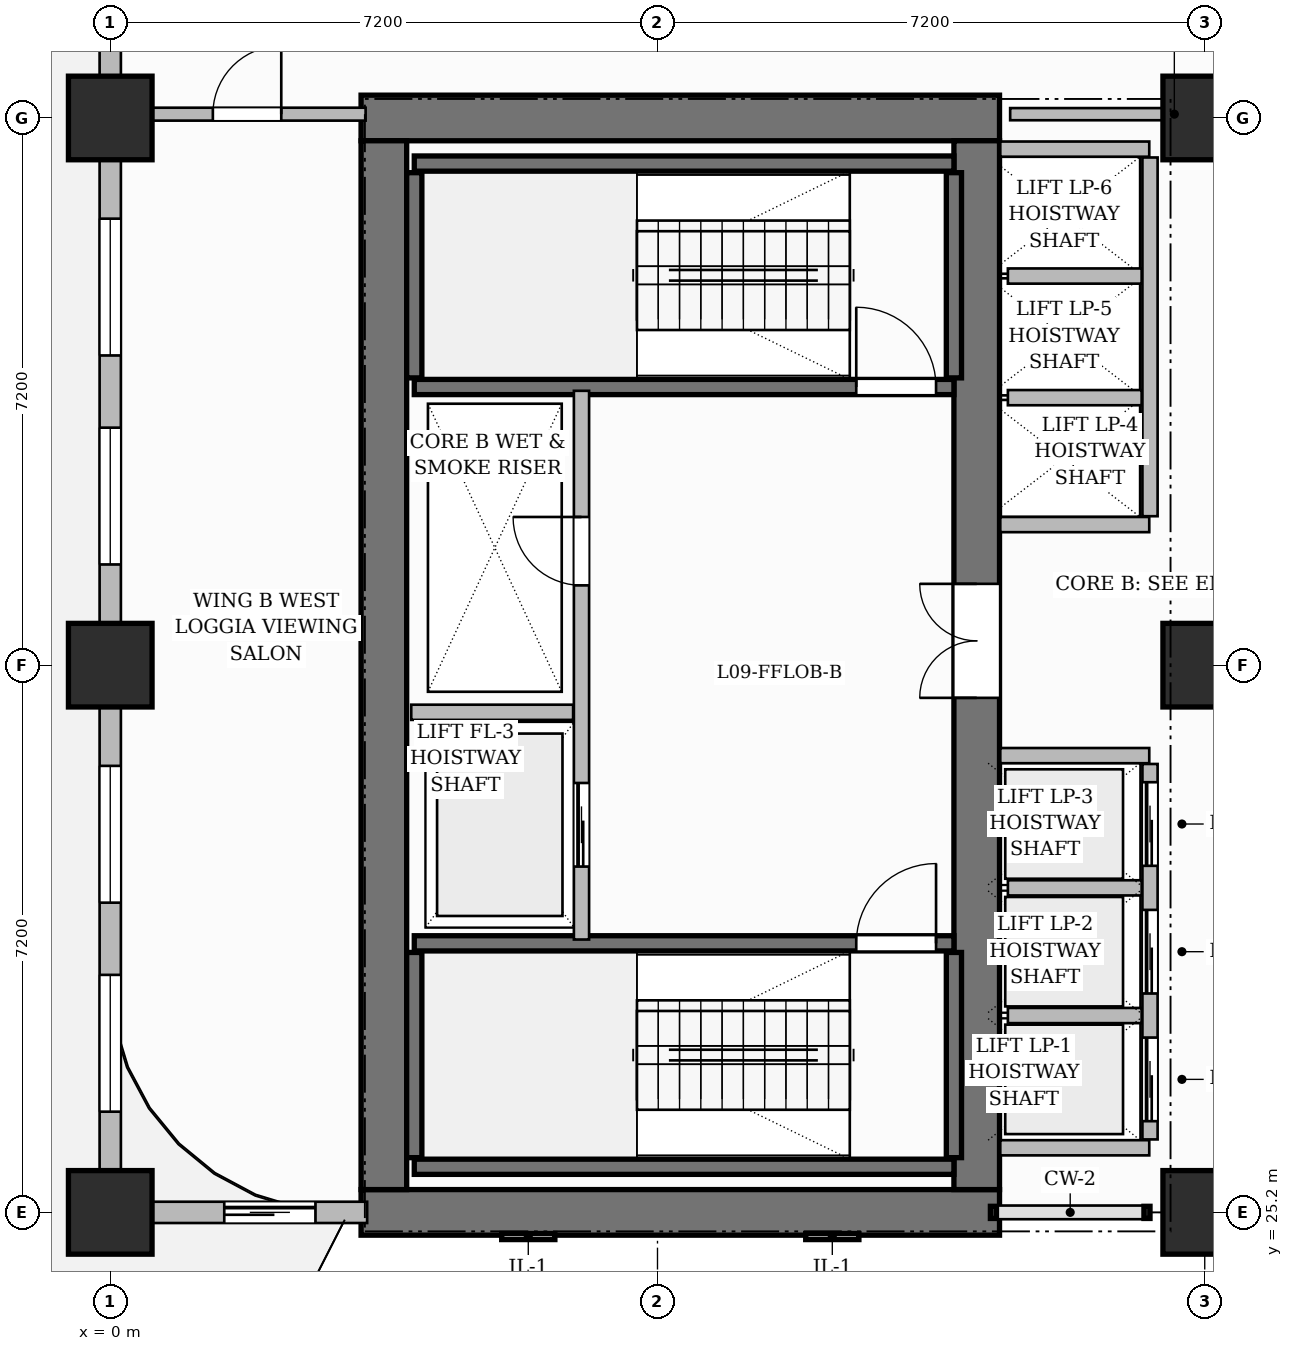
"""IFC4 building model, lengths in metres.
Left out: names, types, materials, properties, quantities, classifications, styles, units other than length and angle.
Written with IfcOpenShell. Run it as: python <this file> out.ifc"""

import sys

from ifc_helpers import new_model, si_unit, direction, frame, frame_2d, origin, origin_2d, place, context, subcontext, project, spatial, rectangle, extrude, source, transform, mapped, element, fill, save


model = new_model("IFC4")
c1 = context("Model", 3, precision=1e-05, world=origin(), true_north=direction((0.0, 1.0)))
c2 = subcontext(c1, "Body", "Model", "MODEL_VIEW")
j1 = project(units=[si_unit("LENGTHUNIT", "METRE"), si_unit("PLANEANGLEUNIT", "RADIAN")], contexts=[c1])
p1 = place(None, origin())
s1 = spatial("IfcSite", under=j1, at=p1, CompositionType="ELEMENT")
p2 = place(p1, origin())
s2 = spatial("IfcBuilding", under=s1, at=p2, CompositionType="ELEMENT")
p3 = place(p2, frame((0.0, 0.0, 43.5)))
s3 = spatial("IfcBuildingStorey", under=s2, at=p3, CompositionType="ELEMENT", Elevation=43.5)
for number, where, z_axis, x_axis in (
    (1, (3.3, 25.2, 0.0), (0.0, 0.0, 1.0), (1.0, 0.0, 0.0)),
    (2, (3.3, 39.6, 0.0), (0.0, 0.0, 1.0), (1.0, 0.0, 0.0)),
):
    element("IfcWall", number, at=place(p3, frame(where, z_axis=z_axis, x_axis=x_axis)), inside=s3, PredefinedType="SHEAR", context=c2, shape_type="SweptSolid", body=[
        extrude(rectangle(XDim=8.4, YDim=0.6, at=frame_2d((4.2, 0.0))), origin(), (0.0, 0.0, 1.0), 3.7),
    ])
p4 = place(p3, frame((3.6, 25.5, 0.0), z_axis=(0.0, 0.0, 1.0), x_axis=(0.0, 1.0, 0.0)))
e3 = element("IfcWall", 3, at=p4, inside=s3, PredefinedType="SHEAR", context=c2, shape_type="SweptSolid", body=[
    extrude(rectangle(XDim=13.8, YDim=0.6, at=frame_2d((6.9, 0.0))), origin(), (0.0, 0.0, 1.0), 3.7),
])
p5 = place(p3, frame((11.4, 25.5, 0.0), z_axis=(0.0, 0.0, 1.0), x_axis=(0.0, 1.0, 0.0)))
e4 = element("IfcWall", 4, at=p5, inside=s3, PredefinedType="SHEAR", context=c2, shape_type="SweptSolid", body=[
    extrude(rectangle(XDim=13.8, YDim=0.6, at=frame_2d((6.9, 0.0))), origin(), (0.0, 0.0, 1.0), 3.7),
])
p6 = place(p5, frame((6.47, 0.0, 0.0)))
e5 = element("IfcOpeningElement", 5, at=p6, cuts=e4, PredefinedType="OPENING", context=c2, shape_type="SweptSolid", body=[
    extrude(rectangle(XDim=1.5, YDim=2.2, at=frame_2d((0.75, 1.1))), frame((0.0, 0.31, 0.0), z_axis=(0.0, -1.0, 0.0), x_axis=(1.0, 0.0, 0.0)), (0.0, 0.0, 1.0), 0.62),
])
m1 = source(origin(), c2, "Body", "SweptSolid", [
    extrude(rectangle(XDim=1.1, YDim=1.1, at=origin_2d()), origin(), (0.0, 0.0, 1.0), 3.7),
])
for number, where, z_axis, x_axis in (
    (6, (0.0, 25.2, 0.0), (0.0, 0.0, 1.0), (1.0, 0.0, 0.0)),
    (7, (0.0, 32.4, 0.0), (0.0, 0.0, 1.0), (1.0, 0.0, 0.0)),
    (8, (0.0, 39.6, 0.0), (0.0, 0.0, 1.0), (1.0, 0.0, 0.0)),
    (9, (14.4, 25.2, 0.0), (0.0, 0.0, 1.0), (1.0, 0.0, 0.0)),
    (10, (14.4, 32.4, 0.0), (0.0, 0.0, 1.0), (1.0, 0.0, 0.0)),
    (11, (14.4, 39.6, 0.0), (0.0, 0.0, 1.0), (1.0, 0.0, 0.0)),
):
    element("IfcColumn", number, at=place(p3, frame(where, z_axis=z_axis, x_axis=x_axis)), inside=s3, PredefinedType="COLUMN", context=c2, shape_type="MappedRepresentation", body=[
        mapped(m1, transform((0.0, 0.0, 0.0), scale=1.0)),
    ])
p7 = place(p3, frame((4.0, 25.8, 0.0), z_axis=(0.0, 0.0, 1.0), x_axis=(1.0, 0.0, 0.0)))
e12 = element("IfcWall", 12, at=p7, inside=s3, PredefinedType="SHEAR", context=c2, shape_type="SweptSolid", body=[
    extrude(rectangle(XDim=7.1, YDim=0.2, at=frame_2d((3.55, 0.0))), origin(), (0.0, 0.0, 1.0), 3.7),
])
for number, where, z_axis, x_axis in (
    (13, (4.0, 25.92, 0.0), (0.0, 0.0, 1.0), (0.0, 1.0, 0.0)),
    (14, (11.1, 25.92, 0.0), (0.0, 0.0, 1.0), (0.0, 1.0, 0.0)),
):
    element("IfcWall", number, at=place(p3, frame(where, z_axis=z_axis, x_axis=x_axis)), inside=s3, PredefinedType="SHEAR", context=c2, shape_type="SweptSolid", body=[
        extrude(rectangle(XDim=2.7, YDim=0.2, at=frame_2d((1.35, 0.0))), origin(), (0.0, 0.0, 1.0), 3.7),
    ])
p8 = place(p3, frame((4.0, 28.74, 0.0), z_axis=(0.0, 0.0, 1.0), x_axis=(1.0, 0.0, 0.0)))
e15 = element("IfcWall", 15, at=p8, inside=s3, PredefinedType="SHEAR", context=c2, shape_type="SweptSolid", body=[
    extrude(rectangle(XDim=7.1, YDim=0.2, at=frame_2d((3.55, 0.0))), origin(), (0.0, 0.0, 1.0), 3.7),
])
p9 = place(p8, frame((5.815, 0.0, 0.0)))
e16 = element("IfcOpeningElement", 16, at=p9, cuts=e15, PredefinedType="OPENING", context=c2, shape_type="SweptSolid", body=[
    extrude(rectangle(XDim=1.05, YDim=2.2, at=frame_2d((0.525, 1.1))), frame((0.0, 0.11, 0.0), z_axis=(0.0, -1.0, 0.0), x_axis=(1.0, 0.0, 0.0)), (0.0, 0.0, 1.0), 0.22),
])
p10 = place(p3, frame((4.0, 39.0, 0.0), z_axis=(0.0, 0.0, 1.0), x_axis=(1.0, 0.0, 0.0)))
e17 = element("IfcWall", 17, at=p10, inside=s3, PredefinedType="SHEAR", context=c2, shape_type="SweptSolid", body=[
    extrude(rectangle(XDim=7.1, YDim=0.2, at=frame_2d((3.55, 0.0))), origin(), (0.0, 0.0, 1.0), 3.7),
])
for number, where, z_axis, x_axis in (
    (18, (4.0, 36.18, 0.0), (0.0, 0.0, 1.0), (0.0, 1.0, 0.0)),
    (19, (11.1, 36.18, 0.0), (0.0, 0.0, 1.0), (0.0, 1.0, 0.0)),
):
    element("IfcWall", number, at=place(p3, frame(where, z_axis=z_axis, x_axis=x_axis)), inside=s3, PredefinedType="SHEAR", context=c2, shape_type="SweptSolid", body=[
        extrude(rectangle(XDim=2.7, YDim=0.2, at=frame_2d((1.35, 0.0))), origin(), (0.0, 0.0, 1.0), 3.7),
    ])
p11 = place(p3, frame((4.0, 36.06, 0.0), z_axis=(0.0, 0.0, 1.0), x_axis=(1.0, 0.0, 0.0)))
e20 = element("IfcWall", 20, at=p11, inside=s3, PredefinedType="SHEAR", context=c2, shape_type="SweptSolid", body=[
    extrude(rectangle(XDim=7.1, YDim=0.2, at=frame_2d((3.55, 0.0))), origin(), (0.0, 0.0, 1.0), 3.7),
])
p12 = place(p11, frame((5.815, 0.0, 0.0)))
e21 = element("IfcOpeningElement", 21, at=p12, cuts=e20, PredefinedType="OPENING", context=c2, shape_type="SweptSolid", body=[
    extrude(rectangle(XDim=1.05, YDim=2.2, at=frame_2d((0.525, 1.1))), frame((0.0, 0.11, 0.0), z_axis=(0.0, -1.0, 0.0), x_axis=(1.0, 0.0, 0.0)), (0.0, 0.0, 1.0), 0.22),
])
p13 = place(p3, frame((6.2, 28.79, 0.0), z_axis=(0.0, 0.0, 1.0), x_axis=(0.0, 1.0, 0.0)))
e22 = element("IfcWall", 22, at=p13, inside=s3, PredefinedType="PARTITIONING", context=c2, shape_type="SweptSolid", body=[
    extrude(rectangle(XDim=7.22, YDim=0.2, at=frame_2d((3.61, 0.0))), origin(), (0.0, 0.0, 1.0), 3.45),
])
p14 = place(p13, frame((4.66, 0.0, 0.0)))
e23 = element("IfcOpeningElement", 23, at=p14, cuts=e22, PredefinedType="OPENING", context=c2, shape_type="SweptSolid", body=[
    extrude(rectangle(XDim=0.9, YDim=2.1, at=frame_2d((0.45, 1.05))), frame((0.0, 0.11, 0.0), z_axis=(0.0, -1.0, 0.0), x_axis=(1.0, 0.0, 0.0)), (0.0, 0.0, 1.0), 0.22),
])
p15 = place(p13, frame((0.96, 0.0, 0.0)))
e24 = element("IfcOpeningElement", 24, at=p15, cuts=e22, PredefinedType="OPENING", context=c2, shape_type="SweptSolid", body=[
    extrude(rectangle(XDim=1.1, YDim=2.2, at=frame_2d((0.55, 1.1))), frame((0.0, 0.11, 0.0), z_axis=(0.0, -1.0, 0.0), x_axis=(1.0, 0.0, 0.0)), (0.0, 0.0, 1.0), 0.22),
])
p16 = place(p3, frame((3.96, 31.78, 0.0), z_axis=(0.0, 0.0, 1.0), x_axis=(1.0, 0.0, 0.0)))
e25 = element("IfcWall", 25, at=p16, inside=s3, PredefinedType="PARTITIONING", context=c2, shape_type="SweptSolid", body=[
    extrude(rectangle(XDim=2.13, YDim=0.2, at=frame_2d((1.065, 0.0))), origin(), (0.0, 0.0, 1.0), 3.45),
])
for number, where, z_axis, x_axis in (
    (26, (11.71, 26.05, 0.0), (0.0, 0.0, 1.0), (1.0, 0.0, 0.0)),
    (27, (11.71, 31.21, 0.0), (0.0, 0.0, 1.0), (1.0, 0.0, 0.0)),
):
    element("IfcWall", number, at=place(p3, frame(where, z_axis=z_axis, x_axis=x_axis)), inside=s3, PredefinedType="PARTITIONING", context=c2, shape_type="SweptSolid", body=[
        extrude(rectangle(XDim=1.96, YDim=0.2, at=frame_2d((0.98, 0.0))), origin(), (0.0, 0.0, 1.0), 3.45),
    ])
p17 = place(p3, frame((13.68, 26.16, 0.0), z_axis=(0.0, 0.0, 1.0), x_axis=(0.0, 1.0, 0.0)))
e28 = element("IfcWall", 28, at=p17, inside=s3, PredefinedType="PARTITIONING", context=c2, shape_type="SweptSolid", body=[
    extrude(rectangle(XDim=4.94, YDim=0.2, at=frame_2d((2.47, 0.0))), origin(), (0.0, 0.0, 1.0), 3.45),
])
p18 = place(p17, frame((0.24, 0.0, 0.0)))
e29 = element("IfcOpeningElement", 29, at=p18, cuts=e28, PredefinedType="OPENING", context=c2, shape_type="SweptSolid", body=[
    extrude(rectangle(XDim=1.1, YDim=2.2, at=frame_2d((0.55, 1.1))), frame((0.0, 0.11, 0.0), z_axis=(0.0, -1.0, 0.0), x_axis=(1.0, 0.0, 0.0)), (0.0, 0.0, 1.0), 0.22),
])
p19 = place(p17, frame((1.92, 0.0, 0.0)))
e30 = element("IfcOpeningElement", 30, at=p19, cuts=e28, PredefinedType="OPENING", context=c2, shape_type="SweptSolid", body=[
    extrude(rectangle(XDim=1.1, YDim=2.2, at=frame_2d((0.55, 1.1))), frame((0.0, 0.11, 0.0), z_axis=(0.0, -1.0, 0.0), x_axis=(1.0, 0.0, 0.0)), (0.0, 0.0, 1.0), 0.22),
])
p20 = place(p17, frame((3.6, 0.0, 0.0)))
e31 = element("IfcOpeningElement", 31, at=p20, cuts=e28, PredefinedType="OPENING", context=c2, shape_type="SweptSolid", body=[
    extrude(rectangle(XDim=1.1, YDim=2.2, at=frame_2d((0.55, 1.1))), frame((0.0, 0.11, 0.0), z_axis=(0.0, -1.0, 0.0), x_axis=(1.0, 0.0, 0.0)), (0.0, 0.0, 1.0), 0.22),
])
for number, where, z_axis, x_axis in (
    (32, (11.81, 27.79, 0.0), (0.0, 0.0, 1.0), (1.0, 0.0, 0.0)),
    (33, (11.81, 29.47, 0.0), (0.0, 0.0, 1.0), (1.0, 0.0, 0.0)),
):
    element("IfcWall", number, at=place(p3, frame(where, z_axis=z_axis, x_axis=x_axis)), inside=s3, PredefinedType="PARTITIONING", context=c2, shape_type="SweptSolid", body=[
        extrude(rectangle(XDim=1.76, YDim=0.2, at=frame_2d((0.88, 0.0))), origin(), (0.0, 0.0, 1.0), 3.45),
    ])
for number, where, z_axis, x_axis in (
    (34, (11.71, 34.25, 0.0), (0.0, 0.0, 1.0), (1.0, 0.0, 0.0)),
    (35, (11.71, 39.19, 0.0), (0.0, 0.0, 1.0), (1.0, 0.0, 0.0)),
):
    element("IfcWall", number, at=place(p3, frame(where, z_axis=z_axis, x_axis=x_axis)), inside=s3, PredefinedType="PARTITIONING", context=c2, shape_type="SweptSolid", body=[
        extrude(rectangle(XDim=1.96, YDim=0.2, at=frame_2d((0.98, 0.0))), origin(), (0.0, 0.0, 1.0), 3.45),
    ])
p21 = place(p3, frame((13.68, 34.36, 0.0), z_axis=(0.0, 0.0, 1.0), x_axis=(0.0, 1.0, 0.0)))
e36 = element("IfcWall", 36, at=p21, inside=s3, PredefinedType="PARTITIONING", context=c2, shape_type="SweptSolid", body=[
    extrude(rectangle(XDim=4.72, YDim=0.2, at=frame_2d((2.36, 0.0))), origin(), (0.0, 0.0, 1.0), 3.45),
])
for number, where, z_axis, x_axis in (
    (37, (11.81, 35.92, 0.0), (0.0, 0.0, 1.0), (1.0, 0.0, 0.0)),
    (38, (11.81, 37.52, 0.0), (0.0, 0.0, 1.0), (1.0, 0.0, 0.0)),
):
    element("IfcWall", number, at=place(p3, frame(where, z_axis=z_axis, x_axis=x_axis)), inside=s3, PredefinedType="PARTITIONING", context=c2, shape_type="SweptSolid", body=[
        extrude(rectangle(XDim=1.76, YDim=0.2, at=frame_2d((0.88, 0.0))), origin(), (0.0, 0.0, 1.0), 3.45),
    ])
p22 = place(p3, frame((11.84, 39.65, 0.0), z_axis=(0.0, 0.0, 1.0), x_axis=(1.0, 0.0, 0.0)))
e39 = element("IfcWall", 39, at=p22, inside=s3, PredefinedType="PARTITIONING", context=c2, shape_type="SweptSolid", body=[
    extrude(rectangle(XDim=4.32, YDim=0.16, at=frame_2d((2.16, 0.0))), origin(), (0.0, 0.0, 1.0), 2.885),
])
p23 = place(p3, frame((0.24, 39.65, 0.0), z_axis=(0.0, 0.0, 1.0), x_axis=(1.0, 0.0, 0.0)))
e40 = element("IfcWall", 40, at=p23, inside=s3, PredefinedType="PARTITIONING", context=c2, shape_type="SweptSolid", body=[
    extrude(rectangle(XDim=3.12, YDim=0.17, at=frame_2d((1.56, 0.0))), origin(), (0.0, 0.0, 1.0), 3.45),
])
p24 = place(p23, frame((1.11, 0.0, 0.0)))
e41 = element("IfcOpeningElement", 41, at=p24, cuts=e40, PredefinedType="OPENING", context=c2, shape_type="SweptSolid", body=[
    extrude(rectangle(XDim=0.9, YDim=2.15, at=frame_2d((0.45, 1.075))), frame((0.0, 0.095, 0.0), z_axis=(0.0, -1.0, 0.0), x_axis=(1.0, 0.0, 0.0)), (0.0, 0.0, 1.0), 0.19),
])
p25 = place(p3, frame((0.0, 25.2, 0.0), z_axis=(0.0, 0.0, 1.0), x_axis=(1.0, 0.0, 0.0)))
e42 = element("IfcWall", 42, at=p25, inside=s3, PredefinedType="SOLIDWALL", context=c2, shape_type="SweptSolid", body=[
    extrude(rectangle(XDim=3.38, YDim=0.28, at=frame_2d((1.69, 0.0))), origin(), (0.0, 0.0, 1.0), 3.45),
])
p26 = place(p25, frame((1.5, 0.0, 0.0)))
e43 = element("IfcOpeningElement", 43, at=p26, cuts=e42, PredefinedType="OPENING", context=c2, shape_type="SweptSolid", body=[
    extrude(rectangle(XDim=1.2, YDim=2.2, at=frame_2d((0.6, 1.1))), frame((0.0, 0.15, 0.0), z_axis=(0.0, -1.0, 0.0), x_axis=(1.0, 0.0, 0.0)), (0.0, 0.0, 1.0), 0.3),
])
p27 = place(p3, frame((0.0, 25.25, 0.0), z_axis=(0.0, 0.0, 1.0), x_axis=(0.0, 1.0, 0.0)))
e44 = element("IfcWall", 44, at=p27, inside=s3, PredefinedType="SOLIDWALL", context=c2, shape_type="SweptSolid", body=[
    extrude(rectangle(XDim=21.5, YDim=0.28, at=frame_2d((10.75, 0.0))), origin(), (0.0, 0.0, 1.0), 2.885),
])
p28 = place(p27, frame((1.275, 0.0, 0.8)))
e45 = element("IfcOpeningElement", 45, at=p28, cuts=e44, PredefinedType="OPENING", context=c2, shape_type="SweptSolid", body=[
    extrude(rectangle(XDim=1.8, YDim=1.85, at=frame_2d((0.9, 0.925))), frame((0.0, 0.15, 0.0), z_axis=(0.0, -1.0, 0.0), x_axis=(1.0, 0.0, 0.0)), (0.0, 0.0, 1.0), 0.3),
])
p29 = place(p27, frame((4.025, 0.0, 0.8)))
e46 = element("IfcOpeningElement", 46, at=p29, cuts=e44, PredefinedType="OPENING", context=c2, shape_type="SweptSolid", body=[
    extrude(rectangle(XDim=1.8, YDim=1.85, at=frame_2d((0.9, 0.925))), frame((0.0, 0.15, 0.0), z_axis=(0.0, -1.0, 0.0), x_axis=(1.0, 0.0, 0.0)), (0.0, 0.0, 1.0), 0.3),
])
p30 = place(p27, frame((8.475, 0.0, 0.8)))
e47 = element("IfcOpeningElement", 47, at=p30, cuts=e44, PredefinedType="OPENING", context=c2, shape_type="SweptSolid", body=[
    extrude(rectangle(XDim=1.8, YDim=1.85, at=frame_2d((0.9, 0.925))), frame((0.0, 0.15, 0.0), z_axis=(0.0, -1.0, 0.0), x_axis=(1.0, 0.0, 0.0)), (0.0, 0.0, 1.0), 0.3),
])
p31 = place(p27, frame((11.225, 0.0, 0.8)))
e48 = element("IfcOpeningElement", 48, at=p31, cuts=e44, PredefinedType="OPENING", context=c2, shape_type="SweptSolid", body=[
    extrude(rectangle(XDim=1.8, YDim=1.85, at=frame_2d((0.9, 0.925))), frame((0.0, 0.15, 0.0), z_axis=(0.0, -1.0, 0.0), x_axis=(1.0, 0.0, 0.0)), (0.0, 0.0, 1.0), 0.3),
])
p32 = place(p27, frame((15.447, 0.0, 0.8)))
e49 = element("IfcOpeningElement", 49, at=p32, cuts=e44, PredefinedType="OPENING", context=c2, shape_type="SweptSolid", body=[
    extrude(rectangle(XDim=1.4, YDim=1.85, at=frame_2d((0.7, 0.925))), frame((0.0, 0.15, 0.0), z_axis=(0.0, -1.0, 0.0), x_axis=(1.0, 0.0, 0.0)), (0.0, 0.0, 1.0), 0.3),
])
p33 = place(p27, frame((18.053, 0.0, 0.8)))
e50 = element("IfcOpeningElement", 50, at=p33, cuts=e44, PredefinedType="OPENING", context=c2, shape_type="SweptSolid", body=[
    extrude(rectangle(XDim=1.8, YDim=1.85, at=frame_2d((0.9, 0.925))), frame((0.0, 0.15, 0.0), z_axis=(0.0, -1.0, 0.0), x_axis=(1.0, 0.0, 0.0)), (0.0, 0.0, 1.0), 0.3),
])
m2 = source(origin(), c2, "Body", "SweptSolid", [
    extrude(rectangle(XDim=1.05, YDim=2.2, at=frame_2d((0.525, 1.1))), frame((0.0, 0.025, 0.0), z_axis=(0.0, -1.0, 0.0), x_axis=(1.0, 0.0, 0.0)), (0.0, 0.0, 1.0), 0.05),
])
p34 = place(p9, origin())
e51 = element("IfcDoor", 51, at=p34, inside=s3, OperationType="SINGLE_SWING_RIGHT", PredefinedType="DOOR", context=c2, shape_type="MappedRepresentation", body=[
    mapped(m2, transform((0.0, 0.0, 0.0), scale=1.0)),
])
fill(e16, e51)
p35 = place(p12, origin())
e52 = element("IfcDoor", 52, at=p35, inside=s3, OperationType="SINGLE_SWING_LEFT", PredefinedType="DOOR", context=c2, shape_type="MappedRepresentation", body=[
    mapped(m2, transform((0.0, 0.0, 0.0), scale=1.0)),
])
fill(e21, e52)
m3 = source(origin(), c2, "Body", "SweptSolid", [
    extrude(rectangle(XDim=0.9, YDim=2.1, at=frame_2d((0.45, 1.05))), frame((0.0, 0.025, 0.0), z_axis=(0.0, -1.0, 0.0), x_axis=(1.0, 0.0, 0.0)), (0.0, 0.0, 1.0), 0.05),
])
p36 = place(p14, origin())
e53 = element("IfcDoor", 53, at=p36, inside=s3, OperationType="SINGLE_SWING_RIGHT", PredefinedType="DOOR", context=c2, shape_type="MappedRepresentation", body=[
    mapped(m3, transform((0.0, 0.0, 0.0), scale=1.0)),
])
fill(e23, e53)
m4 = source(origin(), c2, "Body", "SweptSolid", [
    extrude(rectangle(XDim=1.5, YDim=2.2, at=frame_2d((0.75, 1.1))), frame((0.0, 0.025, 0.0), z_axis=(0.0, -1.0, 0.0), x_axis=(1.0, 0.0, 0.0)), (0.0, 0.0, 1.0), 0.05),
])
p37 = place(p6, origin())
e54 = element("IfcDoor", 54, at=p37, inside=s3, OperationType="DOUBLE_DOOR_SINGLE_SWING", PredefinedType="DOOR", context=c2, shape_type="MappedRepresentation", body=[
    mapped(m4, transform((0.0, 0.0, 0.0), scale=1.0)),
])
fill(e5, e54)
m5 = source(origin(), c2, "Body", "SweptSolid", [
    extrude(rectangle(XDim=0.9, YDim=2.15, at=frame_2d((0.45, 1.075))), frame((0.0, 0.025, 0.0), z_axis=(0.0, -1.0, 0.0), x_axis=(1.0, 0.0, 0.0)), (0.0, 0.0, 1.0), 0.05),
])
p38 = place(p24, origin())
e55 = element("IfcDoor", 55, at=p38, inside=s3, OperationType="SINGLE_SWING_RIGHT", PredefinedType="DOOR", context=c2, shape_type="MappedRepresentation", body=[
    mapped(m5, transform((0.0, 0.0, 0.0), scale=1.0)),
])
fill(e41, e55)
m6 = source(origin(), c2, "Body", "SweptSolid", [
    extrude(rectangle(XDim=1.1, YDim=2.2, at=frame_2d((0.55, 1.1))), frame((0.0, 0.025, 0.0), z_axis=(0.0, -1.0, 0.0), x_axis=(1.0, 0.0, 0.0)), (0.0, 0.0, 1.0), 0.05),
])
p39 = place(p15, origin())
e56 = element("IfcDoor", 56, at=p39, inside=s3, OperationType="SLIDING_TO_LEFT", PredefinedType="DOOR", context=c2, shape_type="MappedRepresentation", body=[
    mapped(m6, transform((0.0, 0.0, 0.0), scale=1.0)),
])
fill(e24, e56)
p40 = place(p18, origin())
e57 = element("IfcDoor", 57, at=p40, inside=s3, OperationType="SLIDING_TO_LEFT", PredefinedType="DOOR", context=c2, shape_type="MappedRepresentation", body=[
    mapped(m6, transform((0.0, 0.0, 0.0), scale=1.0)),
])
fill(e29, e57)
p41 = place(p19, origin())
e58 = element("IfcDoor", 58, at=p41, inside=s3, OperationType="SLIDING_TO_LEFT", PredefinedType="DOOR", context=c2, shape_type="MappedRepresentation", body=[
    mapped(m6, transform((0.0, 0.0, 0.0), scale=1.0)),
])
fill(e30, e58)
p42 = place(p20, origin())
e59 = element("IfcDoor", 59, at=p42, inside=s3, OperationType="SLIDING_TO_LEFT", PredefinedType="DOOR", context=c2, shape_type="MappedRepresentation", body=[
    mapped(m6, transform((0.0, 0.0, 0.0), scale=1.0)),
])
fill(e31, e59)
m7 = source(origin(), c2, "Body", "SweptSolid", [
    extrude(rectangle(XDim=1.2, YDim=2.2, at=frame_2d((0.6, 1.1))), frame((0.0, 0.025, 0.0), z_axis=(0.0, -1.0, 0.0), x_axis=(1.0, 0.0, 0.0)), (0.0, 0.0, 1.0), 0.05),
])
p43 = place(p26, origin())
e60 = element("IfcDoor", 60, at=p43, inside=s3, OperationType="SLIDING_TO_LEFT", PredefinedType="DOOR", context=c2, shape_type="MappedRepresentation", body=[
    mapped(m7, transform((0.0, 0.0, 0.0), scale=1.0)),
])
fill(e43, e60)
m8 = source(origin(), c2, "Body", "SweptSolid", [
    extrude(rectangle(XDim=1.8, YDim=1.85, at=frame_2d((0.9, 0.925))), frame((0.0, 0.03, 0.0), z_axis=(0.0, -1.0, 0.0), x_axis=(1.0, 0.0, 0.0)), (0.0, 0.0, 1.0), 0.06),
])
p44 = place(p28, origin())
e61 = element("IfcWindow", 61, at=p44, inside=s3, PartitioningType="DOUBLE_PANEL_VERTICAL", PredefinedType="WINDOW", context=c2, shape_type="MappedRepresentation", body=[
    mapped(m8, transform((0.0, 0.0, 0.0), scale=1.0)),
])
fill(e45, e61)
p45 = place(p29, origin())
e62 = element("IfcWindow", 62, at=p45, inside=s3, PartitioningType="DOUBLE_PANEL_VERTICAL", PredefinedType="WINDOW", context=c2, shape_type="MappedRepresentation", body=[
    mapped(m8, transform((0.0, 0.0, 0.0), scale=1.0)),
])
fill(e46, e62)
p46 = place(p30, origin())
e63 = element("IfcWindow", 63, at=p46, inside=s3, PartitioningType="DOUBLE_PANEL_VERTICAL", PredefinedType="WINDOW", context=c2, shape_type="MappedRepresentation", body=[
    mapped(m8, transform((0.0, 0.0, 0.0), scale=1.0)),
])
fill(e47, e63)
p47 = place(p31, origin())
e64 = element("IfcWindow", 64, at=p47, inside=s3, PartitioningType="DOUBLE_PANEL_VERTICAL", PredefinedType="WINDOW", context=c2, shape_type="MappedRepresentation", body=[
    mapped(m8, transform((0.0, 0.0, 0.0), scale=1.0)),
])
fill(e48, e64)
save(model, sys.argv[1])
